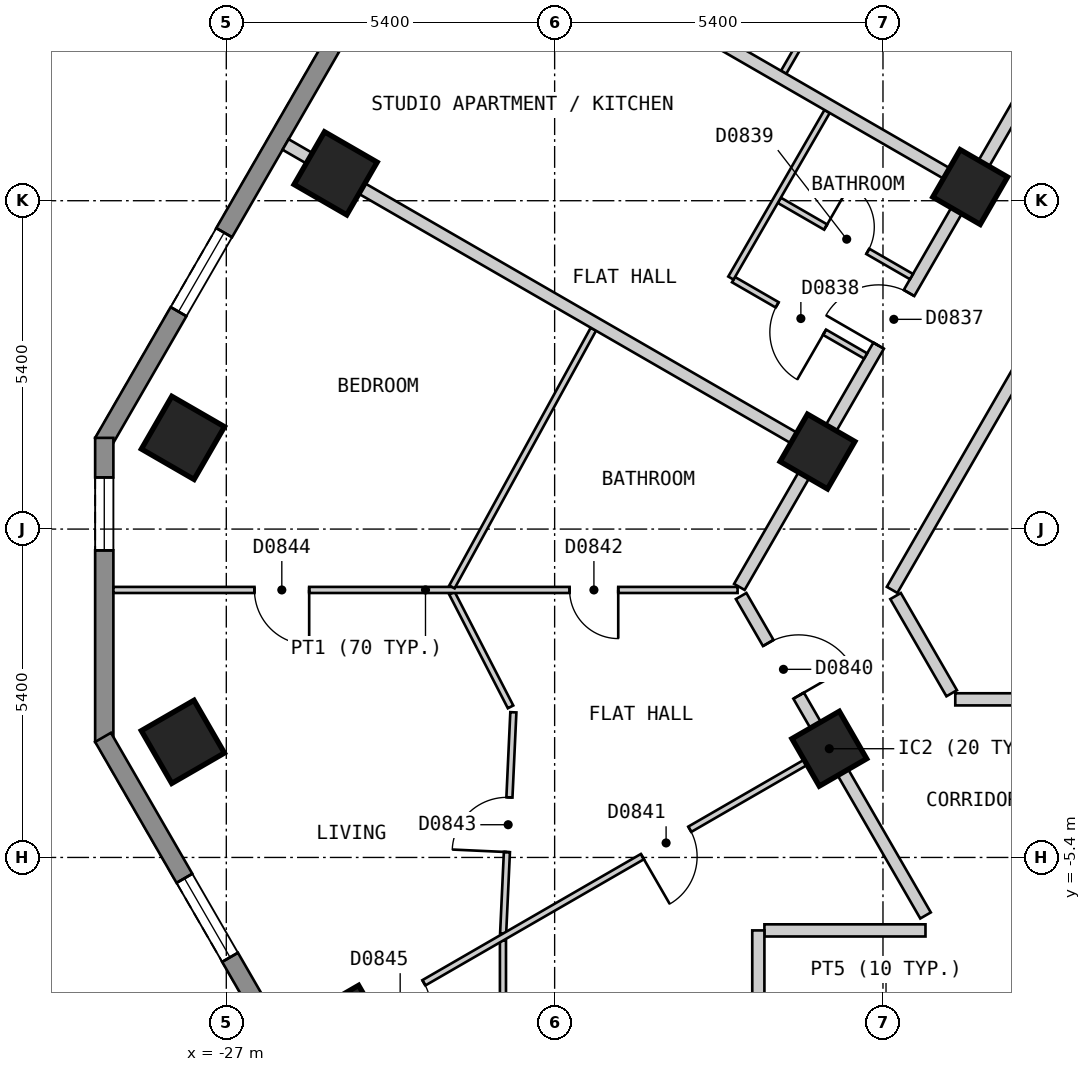
"""IFC4 building model, lengths in metres.
Left out: names, types, materials, properties, quantities, classifications, styles, units other than length and angle.
Written with IfcOpenShell. Run it as: python <this file> out.ifc"""

import sys

from ifc_helpers import new_model, si_unit, direction, frame, frame_2d, origin, origin_2d, place, context, subcontext, project, spatial, polyline, rectangle, outline, extrude, element, fill, save


model = new_model("IFC4")
c1 = context("Model", 3, precision=1e-05, world=origin(), true_north=direction((0.0, 1.0)))
c2 = subcontext(c1, "Body", "Model", "MODEL_VIEW")
j1 = project(units=[si_unit("LENGTHUNIT", "METRE"), si_unit("PLANEANGLEUNIT", "RADIAN")], contexts=[c1])
p1 = place(None, origin())
s1 = spatial("IfcSite", under=j1, at=p1, CompositionType="ELEMENT")
p2 = place(p1, origin())
s2 = spatial("IfcBuilding", under=s1, at=p2, CompositionType="ELEMENT")
p3 = place(p2, frame((0.0, 0.0, 84.0)))
s3 = spatial("IfcBuildingStorey", under=s2, at=p3, CompositionType="ELEMENT", Elevation=84.0)
for number, where, z_axis, x_axis in (
    (1, (-25.202, 5.85, 0.0), (0.0, 0.0, 1.0), (-0.5, -0.866, 0.0)),
    (2, (-27.713, 1.5, 0.0), (0.0, 0.0, 1.0), (-0.5, -0.866, 0.0)),
    (3, (-27.714, -3.499, 0.0), (0.0, 0.0, 1.0), (0.5, -0.866, 0.0)),
    (4, (-25.007, -8.187, 0.0), (0.0, 0.0, 1.0), (0.5, -0.866, 0.0)),
):
    element("IfcColumn", number, at=place(p3, frame(where, z_axis=z_axis, x_axis=x_axis)), inside=s3, PredefinedType="COLUMN", context=c2, shape_type="SweptSolid", body=[
        extrude(rectangle(XDim=1.0, YDim=1.0, at=origin_2d()), origin(), (0.0, 0.0, 1.0), 3.0),
    ])
for number, where, z_axis, x_axis in (
    (5, (-17.083, -3.612, 0.0), (0.0, 0.0, 1.0), (0.5, -0.866, 0.0)),
    (6, (-14.766, 5.625, 0.0), (0.0, 0.0, 1.0), (-0.5, -0.866, 0.0)),
    (7, (-17.277, 1.275, 0.0), (0.0, 0.0, 1.0), (-0.5, -0.866, 0.0)),
):
    element("IfcColumn", number, at=place(p3, frame(where, z_axis=z_axis, x_axis=x_axis)), inside=s3, PredefinedType="COLUMN", context=c2, shape_type="SweptSolid", body=[
        extrude(rectangle(XDim=0.9, YDim=0.9, at=origin_2d()), origin(), (0.0, 0.0, 1.0), 3.0),
    ])
p4 = place(p3, frame((-15.747, 24.425, 0.0), z_axis=(0.0, 0.0, 1.0), x_axis=(-0.500027479704, -0.866009537788, 0.0)))
e8 = element("IfcWall", 8, at=p4, inside=s3, PredefinedType="SOLIDWALL", context=c2, shape_type="SweptSolid", body=[
    extrude(outline(polyline([(0.0, -0.15), (26.559, -0.15), (26.478, 0.15), (0.08, 0.15), (0.0, -0.15)])), origin(), (0.0, 0.0, 1.0), 2.7),
])
p5 = place(p4, frame((2.483, 0.0, 0.15)))
e9 = element("IfcOpeningElement", 9, at=p5, cuts=e8, PredefinedType="OPENING", context=c2, shape_type="SweptSolid", body=[
    extrude(rectangle(XDim=1.5, YDim=2.1, at=frame_2d((0.75, 1.05))), frame((0.0, 0.16, 0.0), z_axis=(0.0, -1.0, 0.0), x_axis=(1.0, 0.0, 0.0)), (0.0, 0.0, 1.0), 0.32),
])
p6 = place(p4, frame((7.506, 0.0, 0.15)))
e10 = element("IfcOpeningElement", 10, at=p6, cuts=e8, PredefinedType="OPENING", context=c2, shape_type="SweptSolid", body=[
    extrude(rectangle(XDim=1.5, YDim=2.1, at=frame_2d((0.75, 1.05))), frame((0.0, 0.16, 0.0), z_axis=(0.0, -1.0, 0.0), x_axis=(1.0, 0.0, 0.0)), (0.0, 0.0, 1.0), 0.32),
])
p7 = place(p4, frame((12.529, 0.0, 0.15)))
e11 = element("IfcOpeningElement", 11, at=p7, cuts=e8, PredefinedType="OPENING", context=c2, shape_type="SweptSolid", body=[
    extrude(rectangle(XDim=1.5, YDim=2.1, at=frame_2d((0.75, 1.05))), frame((0.0, 0.16, 0.0), z_axis=(0.0, -1.0, 0.0), x_axis=(1.0, 0.0, 0.0)), (0.0, 0.0, 1.0), 0.32),
])
p8 = place(p4, frame((17.552, 0.0, 0.15)))
e12 = element("IfcOpeningElement", 12, at=p8, cuts=e8, PredefinedType="OPENING", context=c2, shape_type="SweptSolid", body=[
    extrude(rectangle(XDim=1.5, YDim=2.1, at=frame_2d((0.75, 1.05))), frame((0.0, 0.16, 0.0), z_axis=(0.0, -1.0, 0.0), x_axis=(1.0, 0.0, 0.0)), (0.0, 0.0, 1.0), 0.32),
])
p9 = place(p4, frame((22.575, 0.0, 0.15)))
e13 = element("IfcOpeningElement", 13, at=p9, cuts=e8, PredefinedType="OPENING", context=c2, shape_type="SweptSolid", body=[
    extrude(rectangle(XDim=1.5, YDim=2.1, at=frame_2d((0.75, 1.05))), frame((0.0, 0.16, 0.0), z_axis=(0.0, -1.0, 0.0), x_axis=(1.0, 0.0, 0.0)), (0.0, 0.0, 1.0), 0.32),
])
p10 = place(p3, frame((-29.007, 1.5, 0.0), z_axis=(0.0, 0.0, 1.0), x_axis=(0.0, -1.0, 0.0)))
e14 = element("IfcWall", 14, at=p10, inside=s3, PredefinedType="SOLIDWALL", context=c2, shape_type="SweptSolid", body=[
    extrude(outline(polyline([(0.0, -0.15), (5.0, -0.15), (4.92, 0.15), (0.08, 0.15), (0.0, -0.15)])), origin(), (0.0, 0.0, 1.0), 2.7),
])
p11 = place(p10, frame((0.65, 0.0, 0.15)))
e15 = element("IfcOpeningElement", 15, at=p11, cuts=e14, PredefinedType="OPENING", context=c2, shape_type="SweptSolid", body=[
    extrude(rectangle(XDim=1.2, YDim=2.1, at=frame_2d((0.6, 1.05))), frame((0.0, 0.16, 0.0), z_axis=(0.0, -1.0, 0.0), x_axis=(1.0, 0.0, 0.0)), (0.0, 0.0, 1.0), 0.32),
])
p12 = place(p3, frame((-29.027, -3.425, 0.0), z_axis=(0.0, 0.0, 1.0), x_axis=(0.500035407905, -0.866004960056, 0.0)))
e16 = element("IfcWall", 16, at=p12, inside=s3, PredefinedType="SOLIDWALL", context=c2, shape_type="SweptSolid", body=[
    extrude(outline(polyline([(0.0, -0.15), (23.094, -0.15), (23.014, 0.15), (0.08, 0.15), (0.0, -0.15)])), origin(), (0.0, 0.0, 1.0), 2.7),
])
p13 = place(p12, frame((2.677, 0.0, 0.15)))
e17 = element("IfcOpeningElement", 17, at=p13, cuts=e16, PredefinedType="OPENING", context=c2, shape_type="SweptSolid", body=[
    extrude(rectangle(XDim=1.5, YDim=2.1, at=frame_2d((0.75, 1.05))), frame((0.0, 0.16, 0.0), z_axis=(0.0, -1.0, 0.0), x_axis=(1.0, 0.0, 0.0)), (0.0, 0.0, 1.0), 0.32),
])
p14 = place(p12, frame((8.091, 0.0, 0.15)))
e18 = element("IfcOpeningElement", 18, at=p14, cuts=e16, PredefinedType="OPENING", context=c2, shape_type="SweptSolid", body=[
    extrude(rectangle(XDim=1.5, YDim=2.1, at=frame_2d((0.75, 1.05))), frame((0.0, 0.16, 0.0), z_axis=(0.0, -1.0, 0.0), x_axis=(1.0, 0.0, 0.0)), (0.0, 0.0, 1.0), 0.32),
])
p15 = place(p12, frame((13.504, 0.0, 0.15)))
e19 = element("IfcOpeningElement", 19, at=p15, cuts=e16, PredefinedType="OPENING", context=c2, shape_type="SweptSolid", body=[
    extrude(rectangle(XDim=1.5, YDim=2.1, at=frame_2d((0.75, 1.05))), frame((0.0, 0.16, 0.0), z_axis=(0.0, -1.0, 0.0), x_axis=(1.0, 0.0, 0.0)), (0.0, 0.0, 1.0), 0.32),
])
p16 = place(p12, frame((18.917, 0.0, 0.15)))
e20 = element("IfcOpeningElement", 20, at=p16, cuts=e16, PredefinedType="OPENING", context=c2, shape_type="SweptSolid", body=[
    extrude(rectangle(XDim=1.5, YDim=2.1, at=frame_2d((0.75, 1.05))), frame((0.0, 0.16, 0.0), z_axis=(0.0, -1.0, 0.0), x_axis=(1.0, 0.0, 0.0)), (0.0, 0.0, 1.0), 0.32),
])
p17 = place(p3, frame((-15.993, -1.101, 0.0), z_axis=(0.0, 0.0, 1.0), x_axis=(0.499894174133, -0.866086493757, 0.0)))
e21 = element("IfcWall", 21, at=p17, inside=s3, PredefinedType="PARTITIONING", context=c2, shape_type="SweptSolid", body=[
    extrude(rectangle(XDim=1.846, YDim=0.2, at=frame_2d((0.923, 0.0))), origin(), (0.0, 0.0, 1.0), 2.7),
])
p18 = place(p3, frame((-18.533, -1.101, 0.0), z_axis=(0.0, 0.0, 1.0), x_axis=(0.500022085096, -0.866012652573, 0.0)))
e22 = element("IfcWall", 22, at=p18, inside=s3, PredefinedType="PARTITIONING", context=c2, shape_type="SweptSolid", body=[
    extrude(rectangle(XDim=6.066, YDim=0.2, at=frame_2d((3.033, 0.0))), origin(), (0.0, 0.0, 1.0), 2.7),
])
p19 = place(p18, frame((0.892, 0.0, 0.0)))
e23 = element("IfcOpeningElement", 23, at=p19, cuts=e22, PredefinedType="OPENING", context=c2, shape_type="SweptSolid", body=[
    extrude(rectangle(XDim=1.0, YDim=2.1, at=frame_2d((0.5, 1.05))), frame((0.0, 0.11, 0.0), z_axis=(0.0, -1.0, 0.0), x_axis=(1.0, 0.0, 0.0)), (0.0, 0.0, 1.0), 0.22),
])
p20 = place(p3, frame((-18.15, -6.6, 0.0), z_axis=(0.0, 0.0, 1.0), x_axis=(1.0, 0.0, 0.0)))
e24 = element("IfcWall", 24, at=p20, inside=s3, PredefinedType="PARTITIONING", context=c2, shape_type="SweptSolid", body=[
    extrude(rectangle(XDim=2.649, YDim=0.2, at=frame_2d((1.324, 0.0))), origin(), (0.0, 0.0, 1.0), 2.7),
])
p21 = place(p3, frame((-15.011, -2.8, 0.0), z_axis=(0.0, 0.0, 1.0), x_axis=(1.0, 0.0, 0.0)))
e25 = element("IfcWall", 25, at=p21, inside=s3, PredefinedType="PARTITIONING", context=c2, shape_type="SweptSolid", body=[
    extrude(rectangle(XDim=7.982, YDim=0.2, at=frame_2d((3.991, 0.0))), origin(), (0.0, 0.0, 1.0), 2.7),
])
p22 = place(p3, frame((-16.05, -1.0, 0.0), z_axis=(0.0, 0.0, 1.0), x_axis=(0.499962449088, 0.866047082728, 0.0)))
e26 = element("IfcWall", 26, at=p22, inside=s3, PredefinedType="PARTITIONING", context=c2, shape_type="SweptSolid", body=[
    extrude(rectangle(XDim=10.391, YDim=0.2, at=frame_2d((5.195, 0.0))), origin(), (0.0, 0.0, 1.0), 2.7),
])
p23 = place(p22, frame((4.745, 0.0, 0.0)))
e27 = element("IfcOpeningElement", 27, at=p23, cuts=e26, PredefinedType="OPENING", context=c2, shape_type="SweptSolid", body=[
    extrude(rectangle(XDim=0.9, YDim=2.1, at=frame_2d((0.45, 1.05))), frame((0.0, 0.11, 0.0), z_axis=(0.0, -1.0, 0.0), x_axis=(1.0, 0.0, 0.0)), (0.0, 0.0, 1.0), 0.22),
])
p24 = place(p3, frame((-18.562, -0.951, 0.0), z_axis=(0.0, 0.0, 1.0), x_axis=(0.499992962407, 0.866029466902, 0.0)))
e28 = element("IfcWall", 28, at=p24, inside=s3, PredefinedType="PARTITIONING", context=c2, shape_type="SweptSolid", body=[
    extrude(rectangle(XDim=20.208, YDim=0.2, at=frame_2d((10.104, 0.0))), origin(), (0.0, 0.0, 1.0), 2.7),
])
p25 = place(p24, frame((14.627, 0.0, 0.0)))
e29 = element("IfcOpeningElement", 29, at=p25, cuts=e28, PredefinedType="OPENING", context=c2, shape_type="SweptSolid", body=[
    extrude(rectangle(XDim=1.0, YDim=2.1, at=frame_2d((0.5, 1.05))), frame((0.0, 0.11, 0.0), z_axis=(0.0, -1.0, 0.0), x_axis=(1.0, 0.0, 0.0)), (0.0, 0.0, 1.0), 0.22),
])
p26 = place(p24, frame((4.581, 0.0, 0.0)))
e30 = element("IfcOpeningElement", 30, at=p26, cuts=e28, PredefinedType="OPENING", context=c2, shape_type="SweptSolid", body=[
    extrude(rectangle(XDim=1.0, YDim=2.1, at=frame_2d((0.5, 1.05))), frame((0.0, 0.11, 0.0), z_axis=(0.0, -1.0, 0.0), x_axis=(1.0, 0.0, 0.0)), (0.0, 0.0, 1.0), 0.22),
])
p27 = place(p3, frame((-18.25, -10.421, 0.0), z_axis=(0.0, 0.0, 1.0), x_axis=(0.0, 1.0, 0.0)))
e31 = element("IfcWall", 31, at=p27, inside=s3, PredefinedType="PARTITIONING", context=c2, shape_type="SweptSolid", body=[
    extrude(rectangle(XDim=3.821, YDim=0.2, at=frame_2d((1.91, 0.0))), origin(), (0.0, 0.0, 1.0), 2.7),
])
p28 = place(p3, frame((-23.289, -1.054, 0.0), z_axis=(0.0, 0.0, 1.0), x_axis=(0.458226112305, -0.888835659726, 0.0)))
e32 = element("IfcWall", 32, at=p28, inside=s3, PredefinedType="PARTITIONING", context=c2, shape_type="SweptSolid", body=[
    extrude(rectangle(XDim=2.104, YDim=0.1, at=frame_2d((1.052, 0.0))), origin(), (0.0, 0.0, 1.0), 2.7),
])
p29 = place(p3, frame((-17.905, 5.407, 0.0), z_axis=(0.0, 0.0, 1.0), x_axis=(0.866080321209, -0.499904868165, 0.0)))
e33 = element("IfcWall", 33, at=p29, inside=s3, PredefinedType="PARTITIONING", context=c2, shape_type="SweptSolid", body=[
    extrude(rectangle(XDim=2.51, YDim=0.1, at=frame_2d((1.255, 0.0))), origin(), (0.0, 0.0, 1.0), 2.7),
])
p30 = place(p29, frame((0.88, 0.0, 0.0)))
e34 = element("IfcOpeningElement", 34, at=p30, cuts=e33, PredefinedType="OPENING", context=c2, shape_type="SweptSolid", body=[
    extrude(rectangle(XDim=0.8, YDim=2.1, at=frame_2d((0.4, 1.05))), frame((0.0, 0.06, 0.0), z_axis=(0.0, -1.0, 0.0), x_axis=(1.0, 0.0, 0.0)), (0.0, 0.0, 1.0), 0.12),
])
p31 = place(p3, frame((-18.658, 4.102, 0.0), z_axis=(0.0, 0.0, 1.0), x_axis=(0.865916579361, -0.500188442078, 0.0)))
e35 = element("IfcWall", 35, at=p31, inside=s3, PredefinedType="PARTITIONING", context=c2, shape_type="SweptSolid", body=[
    extrude(rectangle(XDim=2.509, YDim=0.1, at=frame_2d((1.255, 0.0))), origin(), (0.0, 0.0, 1.0), 2.7),
])
p32 = place(p31, frame((0.829, 0.0, 0.0)))
e36 = element("IfcOpeningElement", 36, at=p32, cuts=e35, PredefinedType="OPENING", context=c2, shape_type="SweptSolid", body=[
    extrude(rectangle(XDim=0.9, YDim=2.1, at=frame_2d((0.45, 1.05))), frame((0.0, 0.06, 0.0), z_axis=(0.0, -1.0, 0.0), x_axis=(1.0, 0.0, 0.0)), (0.0, 0.0, 1.0), 0.12),
])
p33 = place(p3, frame((-28.857, -1.001, 0.0), z_axis=(0.0, 0.0, 1.0), x_axis=(1.0, 0.0, 0.0)))
e37 = element("IfcWall", 37, at=p33, inside=s3, PredefinedType="PARTITIONING", context=c2, shape_type="SweptSolid", body=[
    extrude(rectangle(XDim=10.266, YDim=0.1, at=frame_2d((5.133, 0.0))), origin(), (0.0, 0.0, 1.0), 2.7),
])
p34 = place(p33, frame((7.503, 0.0, 0.0)))
e38 = element("IfcOpeningElement", 38, at=p34, cuts=e37, PredefinedType="OPENING", context=c2, shape_type="SweptSolid", body=[
    extrude(rectangle(XDim=0.8, YDim=2.1, at=frame_2d((0.4, 1.05))), frame((0.0, 0.06, 0.0), z_axis=(0.0, -1.0, 0.0), x_axis=(1.0, 0.0, 0.0)), (0.0, 0.0, 1.0), 0.12),
])
p35 = place(p33, frame((2.32, 0.0, 0.0)))
e39 = element("IfcOpeningElement", 39, at=p35, cuts=e37, PredefinedType="OPENING", context=c2, shape_type="SweptSolid", body=[
    extrude(rectangle(XDim=0.9, YDim=2.1, at=frame_2d((0.45, 1.05))), frame((0.0, 0.06, 0.0), z_axis=(0.0, -1.0, 0.0), x_axis=(1.0, 0.0, 0.0)), (0.0, 0.0, 1.0), 0.12),
])
p36 = place(p3, frame((-18.701, 4.128, 0.0), z_axis=(0.0, 0.0, 1.0), x_axis=(0.500023029176, 0.866012107475, 0.0)))
e40 = element("IfcWall", 40, at=p36, inside=s3, PredefinedType="PARTITIONING", context=c2, shape_type="SweptSolid", body=[
    extrude(rectangle(XDim=3.164, YDim=0.1, at=frame_2d((1.582, 0.0))), origin(), (0.0, 0.0, 1.0), 2.7),
])
p37 = place(p3, frame((-17.834, 7.512, 0.0), z_axis=(0.0, 0.0, 1.0), x_axis=(0.500093956194, 0.865971151354, 0.0)))
e41 = element("IfcWall", 41, at=p37, inside=s3, PredefinedType="PARTITIONING", context=c2, shape_type="SweptSolid", body=[
    extrude(rectangle(XDim=4.873, YDim=0.1, at=frame_2d((2.437, 0.0))), origin(), (0.0, 0.0, 1.0), 2.7),
])
p38 = place(p37, frame((2.012, 0.0, 0.0)))
e42 = element("IfcOpeningElement", 42, at=p38, cuts=e41, PredefinedType="OPENING", context=c2, shape_type="SweptSolid", body=[
    extrude(rectangle(XDim=0.8, YDim=2.1, at=frame_2d((0.4, 1.05))), frame((0.0, 0.06, 0.0), z_axis=(0.0, -1.0, 0.0), x_axis=(1.0, 0.0, 0.0)), (0.0, 0.0, 1.0), 0.12),
])
p39 = place(p3, frame((-23.289, -0.951, 0.0), z_axis=(0.0, 0.0, 1.0), x_axis=(0.481164463081, 0.876630343684, 0.0)))
e43 = element("IfcWall", 43, at=p39, inside=s3, PredefinedType="PARTITIONING", context=c2, shape_type="SweptSolid", body=[
    extrude(rectangle(XDim=4.834, YDim=0.1, at=frame_2d((2.417, 0.0))), origin(), (0.0, 0.0, 1.0), 2.7),
])
p40 = place(p3, frame((-22.447, -6.651, 0.0), z_axis=(0.0, 0.0, 1.0), x_axis=(0.046122262393, 0.998935802197, 0.0)))
e44 = element("IfcWall", 44, at=p40, inside=s3, PredefinedType="PARTITIONING", context=c2, shape_type="SweptSolid", body=[
    extrude(rectangle(XDim=3.642, YDim=0.1, at=frame_2d((1.821, 0.0))), origin(), (0.0, 0.0, 1.0), 2.7),
])
p41 = place(p40, frame((1.341, 0.0, 0.0)))
e45 = element("IfcOpeningElement", 45, at=p41, cuts=e44, PredefinedType="OPENING", context=c2, shape_type="SweptSolid", body=[
    extrude(rectangle(XDim=0.9, YDim=2.1, at=frame_2d((0.45, 1.05))), frame((0.0, 0.06, 0.0), z_axis=(0.0, -1.0, 0.0), x_axis=(1.0, 0.0, 0.0)), (0.0, 0.0, 1.0), 0.12),
])
p42 = place(p3, frame((-22.45, -12.846, 0.0), z_axis=(0.0, 0.0, 1.0), x_axis=(0.0, 1.0, 0.0)))
e46 = element("IfcWall", 46, at=p42, inside=s3, PredefinedType="PARTITIONING", context=c2, shape_type="SweptSolid", body=[
    extrude(rectangle(XDim=6.078, YDim=0.1, at=frame_2d((3.039, 0.0))), origin(), (0.0, 0.0, 1.0), 2.7),
])
p43 = place(p3, frame((-25.83, -8.662, 0.0), z_axis=(0.0, 0.0, 1.0), x_axis=(0.866022959057, 0.500004234368, 0.0)))
e47 = element("IfcWall", 47, at=p43, inside=s3, PredefinedType="PARTITIONING", context=c2, shape_type="SweptSolid", body=[
    extrude(rectangle(XDim=10.0, YDim=0.1, at=frame_2d((5.0, 0.0))), origin(), (0.0, 0.0, 1.0), 2.7),
])
p44 = place(p43, frame((6.551, 0.0, 0.0)))
e48 = element("IfcOpeningElement", 48, at=p44, cuts=e47, PredefinedType="OPENING", context=c2, shape_type="SweptSolid", body=[
    extrude(rectangle(XDim=0.9, YDim=2.1, at=frame_2d((0.45, 1.05))), frame((0.0, 0.06, 0.0), z_axis=(0.0, -1.0, 0.0), x_axis=(1.0, 0.0, 0.0)), (0.0, 0.0, 1.0), 0.12),
])
p45 = place(p43, frame((1.501, 0.0, 0.0)))
e49 = element("IfcOpeningElement", 49, at=p45, cuts=e47, PredefinedType="OPENING", context=c2, shape_type="SweptSolid", body=[
    extrude(rectangle(XDim=0.9, YDim=2.1, at=frame_2d((0.45, 1.05))), frame((0.0, 0.06, 0.0), z_axis=(0.0, -1.0, 0.0), x_axis=(1.0, 0.0, 0.0)), (0.0, 0.0, 1.0), 0.12),
])
for number, where, z_axis, x_axis in (
    (50, (-26.025, 6.325, 0.0), (0.0, 0.0, 1.0), (0.866, -0.5, 0.0)),
    (51, (-23.513, 10.675, 0.0), (0.0, 0.0, 1.0), (0.866, -0.5, 0.0)),
):
    element("IfcWall", number, at=place(p3, frame(where, z_axis=z_axis, x_axis=x_axis)), inside=s3, PredefinedType="PARTITIONING", context=c2, shape_type="SweptSolid", body=[
        extrude(rectangle(XDim=10.0, YDim=0.2, at=frame_2d((5.0, 0.0))), origin(), (0.0, 0.0, 1.0), 2.7),
    ])
p46 = place(p9, origin())
e52 = element("IfcWindow", 52, at=p46, inside=s3, PartitioningType="SINGLE_PANEL", PredefinedType="WINDOW", context=c2, shape_type="SweptSolid", body=[
    extrude(rectangle(XDim=1.5, YDim=2.1, at=frame_2d((0.75, 1.05))), frame((0.0, 0.03, 0.0), z_axis=(0.0, -1.0, 0.0), x_axis=(1.0, 0.0, 0.0)), (0.0, 0.0, 1.0), 0.06),
])
fill(e13, e52)
p47 = place(p11, origin())
e53 = element("IfcWindow", 53, at=p47, inside=s3, PartitioningType="SINGLE_PANEL", PredefinedType="WINDOW", context=c2, shape_type="SweptSolid", body=[
    extrude(rectangle(XDim=1.2, YDim=2.1, at=frame_2d((0.6, 1.05))), frame((0.0, 0.03, 0.0), z_axis=(0.0, -1.0, 0.0), x_axis=(1.0, 0.0, 0.0)), (0.0, 0.0, 1.0), 0.06),
])
fill(e15, e53)
p48 = place(p13, origin())
e54 = element("IfcWindow", 54, at=p48, inside=s3, PartitioningType="SINGLE_PANEL", PredefinedType="WINDOW", context=c2, shape_type="SweptSolid", body=[
    extrude(rectangle(XDim=1.5, YDim=2.1, at=frame_2d((0.75, 1.05))), frame((0.0, 0.03, 0.0), z_axis=(0.0, -1.0, 0.0), x_axis=(1.0, 0.0, 0.0)), (0.0, 0.0, 1.0), 0.06),
])
fill(e17, e54)
p49 = place(p26, origin())
e55 = element("IfcDoor", 55, at=p49, inside=s3, OperationType="SINGLE_SWING_LEFT", PredefinedType="DOOR", context=c2, shape_type="SweptSolid", body=[
    extrude(rectangle(XDim=1.0, YDim=2.1, at=frame_2d((0.5, 1.05))), frame((0.0, 0.025, 0.0), z_axis=(0.0, -1.0, 0.0), x_axis=(1.0, 0.0, 0.0)), (0.0, 0.0, 1.0), 0.05),
])
fill(e30, e55)
p50 = place(p32, origin())
e56 = element("IfcDoor", 56, at=p50, inside=s3, OperationType="SINGLE_SWING_RIGHT", PredefinedType="DOOR", context=c2, shape_type="SweptSolid", body=[
    extrude(rectangle(XDim=0.9, YDim=2.1, at=frame_2d((0.45, 1.05))), frame((0.0, 0.025, 0.0), z_axis=(0.0, -1.0, 0.0), x_axis=(1.0, 0.0, 0.0)), (0.0, 0.0, 1.0), 0.05),
])
fill(e36, e56)
p51 = place(p30, origin())
e57 = element("IfcDoor", 57, at=p51, inside=s3, OperationType="SINGLE_SWING_LEFT", PredefinedType="DOOR", context=c2, shape_type="SweptSolid", body=[
    extrude(rectangle(XDim=0.8, YDim=2.1, at=frame_2d((0.4, 1.05))), frame((0.0, 0.025, 0.0), z_axis=(0.0, -1.0, 0.0), x_axis=(1.0, 0.0, 0.0)), (0.0, 0.0, 1.0), 0.05),
])
fill(e34, e57)
p52 = place(p19, origin())
e58 = element("IfcDoor", 58, at=p52, inside=s3, OperationType="SINGLE_SWING_RIGHT", PredefinedType="DOOR", context=c2, shape_type="SweptSolid", body=[
    extrude(rectangle(XDim=1.0, YDim=2.1, at=frame_2d((0.5, 1.05))), frame((0.0, 0.025, 0.0), z_axis=(0.0, -1.0, 0.0), x_axis=(1.0, 0.0, 0.0)), (0.0, 0.0, 1.0), 0.05),
])
fill(e23, e58)
p53 = place(p44, origin())
e59 = element("IfcDoor", 59, at=p53, inside=s3, OperationType="SINGLE_SWING_LEFT", PredefinedType="DOOR", context=c2, shape_type="SweptSolid", body=[
    extrude(rectangle(XDim=0.9, YDim=2.1, at=frame_2d((0.45, 1.05))), frame((0.0, 0.025, 0.0), z_axis=(0.0, -1.0, 0.0), x_axis=(1.0, 0.0, 0.0)), (0.0, 0.0, 1.0), 0.05),
])
fill(e48, e59)
p54 = place(p34, origin())
e60 = element("IfcDoor", 60, at=p54, inside=s3, OperationType="SINGLE_SWING_RIGHT", PredefinedType="DOOR", context=c2, shape_type="SweptSolid", body=[
    extrude(rectangle(XDim=0.8, YDim=2.1, at=frame_2d((0.4, 1.05))), frame((0.0, 0.025, 0.0), z_axis=(0.0, -1.0, 0.0), x_axis=(1.0, 0.0, 0.0)), (0.0, 0.0, 1.0), 0.05),
])
fill(e38, e60)
p55 = place(p41, origin())
e61 = element("IfcDoor", 61, at=p55, inside=s3, OperationType="SINGLE_SWING_LEFT", PredefinedType="DOOR", context=c2, shape_type="SweptSolid", body=[
    extrude(rectangle(XDim=0.9, YDim=2.1, at=frame_2d((0.45, 1.05))), frame((0.0, 0.025, 0.0), z_axis=(0.0, -1.0, 0.0), x_axis=(1.0, 0.0, 0.0)), (0.0, 0.0, 1.0), 0.05),
])
fill(e45, e61)
p56 = place(p35, origin())
e62 = element("IfcDoor", 62, at=p56, inside=s3, OperationType="SINGLE_SWING_RIGHT", PredefinedType="DOOR", context=c2, shape_type="SweptSolid", body=[
    extrude(rectangle(XDim=0.9, YDim=2.1, at=frame_2d((0.45, 1.05))), frame((0.0, 0.025, 0.0), z_axis=(0.0, -1.0, 0.0), x_axis=(1.0, 0.0, 0.0)), (0.0, 0.0, 1.0), 0.05),
])
fill(e39, e62)
p57 = place(p45, origin())
e63 = element("IfcDoor", 63, at=p57, inside=s3, OperationType="SINGLE_SWING_LEFT", PredefinedType="DOOR", context=c2, shape_type="SweptSolid", body=[
    extrude(rectangle(XDim=0.9, YDim=2.1, at=frame_2d((0.45, 1.05))), frame((0.0, 0.025, 0.0), z_axis=(0.0, -1.0, 0.0), x_axis=(1.0, 0.0, 0.0)), (0.0, 0.0, 1.0), 0.05),
])
fill(e49, e63)
save(model, sys.argv[1])
